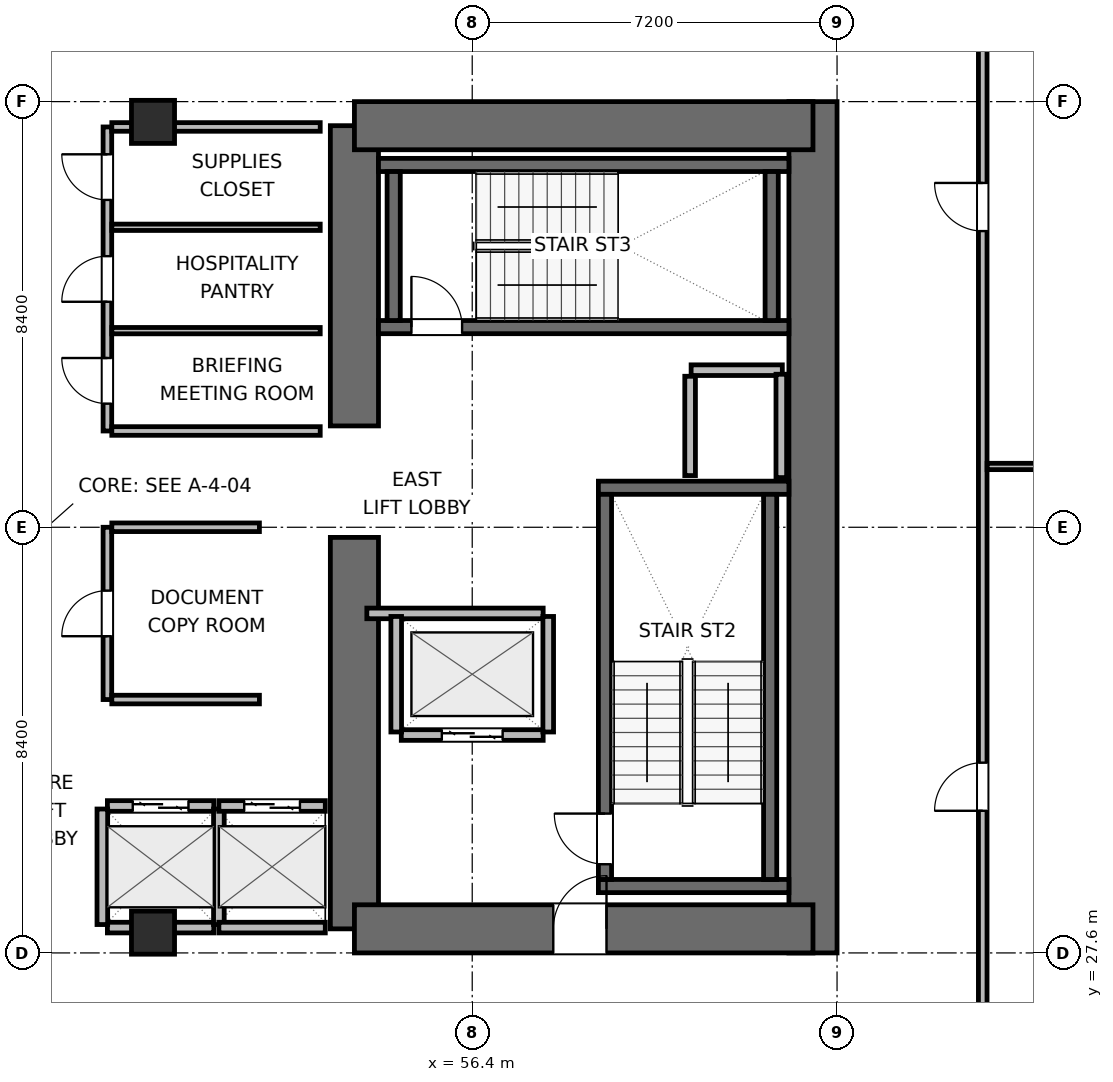
"""IFC4 building model, lengths in metres.
Left out: names, types, materials, properties, quantities, classifications, styles, units other than length and angle.
Written with IfcOpenShell. Run it as: python <this file> out.ifc"""

import sys

from ifc_helpers import new_model, si_unit, direction, frame, frame_2d, origin, origin_2d, place, context, subcontext, project, spatial, rectangle, extrude, element, fill, save


model = new_model("IFC4")
c1 = context("Model", 3, precision=1e-05, world=origin(), true_north=direction((0.0, 1.0)))
c2 = subcontext(c1, "Body", "Model", "MODEL_VIEW")
j1 = project(units=[si_unit("LENGTHUNIT", "METRE"), si_unit("PLANEANGLEUNIT", "RADIAN")], contexts=[c1])
p1 = place(None, origin())
s1 = spatial("IfcSite", under=j1, at=p1, CompositionType="ELEMENT")
p2 = place(p1, origin())
s2 = spatial("IfcBuilding", under=s1, at=p2, CompositionType="ELEMENT")
p3 = place(p2, frame((0.0, 0.0, 60.6)))
s3 = spatial("IfcBuildingStorey", under=s2, at=p3, CompositionType="ELEMENT", Elevation=60.6)
p4 = place(p3, frame((54.075, 28.075, 0.0), z_axis=(0.0, 0.0, 1.0), x_axis=(0.0, 1.0, 0.0)))
e1 = element("IfcWall", 1, at=p4, inside=s3, PredefinedType="SHEAR", context=c2, shape_type="SweptSolid", body=[
    extrude(rectangle(XDim=7.725, YDim=0.95, at=frame_2d((3.863, 0.0))), origin(), (0.0, 0.0, 1.0), 3.9),
])
p5 = place(p3, frame((54.075, 38.0, 0.0), z_axis=(0.0, 0.0, 1.0), x_axis=(0.0, 1.0, 0.0)))
e2 = element("IfcWall", 2, at=p5, inside=s3, PredefinedType="SHEAR", context=c2, shape_type="SweptSolid", body=[
    extrude(rectangle(XDim=5.925, YDim=0.95, at=frame_2d((2.962, 0.0))), origin(), (0.0, 0.0, 1.0), 3.9),
])
p6 = place(p3, frame((63.125, 27.6, 0.0), z_axis=(0.0, 0.0, 1.0), x_axis=(0.0, 1.0, 0.0)))
e3 = element("IfcWall", 3, at=p6, inside=s3, PredefinedType="SHEAR", context=c2, shape_type="SweptSolid", body=[
    extrude(rectangle(XDim=16.8, YDim=0.95, at=frame_2d((8.4, 0.0))), origin(), (0.0, 0.0, 1.0), 3.9),
])
p7 = place(p3, frame((54.075, 28.075, 0.0), z_axis=(0.0, 0.0, 1.0), x_axis=(1.0, 0.0, 0.0)))
e4 = element("IfcWall", 4, at=p7, inside=s3, PredefinedType="SHEAR", context=c2, shape_type="SweptSolid", body=[
    extrude(rectangle(XDim=9.05, YDim=0.95, at=frame_2d((4.525, 0.0))), origin(), (0.0, 0.0, 1.0), 3.9),
])
p8 = place(p7, frame((3.925, 0.0, 0.0)))
e5 = element("IfcOpeningElement", 5, at=p8, cuts=e4, PredefinedType="OPENING", context=c2, shape_type="SweptSolid", body=[
    extrude(rectangle(XDim=1.05, YDim=2.04, at=frame_2d((0.525, 1.02))), frame((0.0, 0.485, 0.0), z_axis=(0.0, -1.0, 0.0), x_axis=(1.0, 0.0, 0.0)), (0.0, 0.0, 1.0), 0.97),
])
p9 = place(p3, frame((54.075, 43.925, 0.0), z_axis=(0.0, 0.0, 1.0), x_axis=(1.0, 0.0, 0.0)))
e6 = element("IfcWall", 6, at=p9, inside=s3, PredefinedType="SHEAR", context=c2, shape_type="SweptSolid", body=[
    extrude(rectangle(XDim=9.05, YDim=0.95, at=frame_2d((4.525, 0.0))), origin(), (0.0, 0.0, 1.0), 3.9),
])
for number, where, z_axis, x_axis in (
    (7, (58.89, 28.92, 0.0), (0.0, 0.0, 1.0), (1.0, 0.0, 0.0)),
    (8, (58.89, 36.78, 0.0), (0.0, 0.0, 1.0), (1.0, 0.0, 0.0)),
):
    element("IfcWall", number, at=place(p3, frame(where, z_axis=z_axis, x_axis=x_axis)), inside=s3, PredefinedType="SHEAR", context=c2, shape_type="SweptSolid", body=[
        extrude(rectangle(XDim=3.76, YDim=0.26, at=frame_2d((1.88, 0.0))), origin(), (0.0, 0.0, 1.0), 3.9),
    ])
p10 = place(p3, frame((59.02, 29.05, 0.0), z_axis=(0.0, 0.0, 1.0), x_axis=(0.0, 1.0, 0.0)))
e9 = element("IfcWall", 9, at=p10, inside=s3, PredefinedType="SHEAR", context=c2, shape_type="SweptSolid", body=[
    extrude(rectangle(XDim=7.6, YDim=0.26, at=frame_2d((3.8, 0.0))), origin(), (0.0, 0.0, 1.0), 3.9),
])
p11 = place(p10, frame((0.3, 0.0, 0.0)))
e10 = element("IfcOpeningElement", 10, at=p11, cuts=e9, PredefinedType="OPENING", context=c2, shape_type="SweptSolid", body=[
    extrude(rectangle(XDim=1.0, YDim=2.04, at=frame_2d((0.5, 1.02))), frame((0.0, 0.14, 0.0), z_axis=(0.0, -1.0, 0.0), x_axis=(1.0, 0.0, 0.0)), (0.0, 0.0, 1.0), 0.28),
])
p12 = place(p3, frame((62.28, 29.05, 0.0), z_axis=(0.0, 0.0, 1.0), x_axis=(0.0, 1.0, 0.0)))
e11 = element("IfcWall", 11, at=p12, inside=s3, PredefinedType="SHEAR", context=c2, shape_type="SweptSolid", body=[
    extrude(rectangle(XDim=7.6, YDim=0.26, at=frame_2d((3.8, 0.0))), origin(), (0.0, 0.0, 1.0), 3.9),
])
p13 = place(p3, frame((54.55, 39.95, 0.0), z_axis=(0.0, 0.0, 1.0), x_axis=(1.0, 0.0, 0.0)))
e12 = element("IfcWall", 12, at=p13, inside=s3, PredefinedType="SHEAR", context=c2, shape_type="SweptSolid", body=[
    extrude(rectangle(XDim=8.1, YDim=0.26, at=frame_2d((4.05, 0.0))), origin(), (0.0, 0.0, 1.0), 3.9),
])
p14 = place(p13, frame((0.65, 0.0, 0.0)))
e13 = element("IfcOpeningElement", 13, at=p14, cuts=e12, PredefinedType="OPENING", context=c2, shape_type="SweptSolid", body=[
    extrude(rectangle(XDim=1.0, YDim=2.04, at=frame_2d((0.5, 1.02))), frame((0.0, 0.14, 0.0), z_axis=(0.0, -1.0, 0.0), x_axis=(1.0, 0.0, 0.0)), (0.0, 0.0, 1.0), 0.28),
])
p15 = place(p3, frame((54.55, 43.15, 0.0), z_axis=(0.0, 0.0, 1.0), x_axis=(1.0, 0.0, 0.0)))
e14 = element("IfcWall", 14, at=p15, inside=s3, PredefinedType="SHEAR", context=c2, shape_type="SweptSolid", body=[
    extrude(rectangle(XDim=8.1, YDim=0.26, at=frame_2d((4.05, 0.0))), origin(), (0.0, 0.0, 1.0), 3.9),
])
for number, where, z_axis, x_axis in (
    (15, (54.85, 40.08, 0.0), (0.0, 0.0, 1.0), (0.0, 1.0, 0.0)),
    (16, (62.31, 40.08, 0.0), (0.0, 0.0, 1.0), (0.0, 1.0, 0.0)),
):
    element("IfcWall", number, at=place(p3, frame(where, z_axis=z_axis, x_axis=x_axis)), inside=s3, PredefinedType="SHEAR", context=c2, shape_type="SweptSolid", body=[
        extrude(rectangle(XDim=2.94, YDim=0.26, at=frame_2d((1.47, 0.0))), origin(), (0.0, 0.0, 1.0), 3.9),
    ])
for number, where, z_axis, x_axis in (
    (17, (50.1, 28.0, 0.0), (0.0, 0.0, 1.0), (1.0, 0.0, 0.0)),
    (18, (50.1, 44.0, 0.0), (0.0, 0.0, 1.0), (1.0, 0.0, 0.0)),
):
    element("IfcColumn", number, at=place(p3, frame(where, z_axis=z_axis, x_axis=x_axis)), inside=s3, PredefinedType="COLUMN", context=c2, shape_type="SweptSolid", body=[
        extrude(rectangle(XDim=0.85, YDim=0.85, at=origin_2d()), origin(), (0.0, 0.0, 1.0), 3.9),
    ])
p16 = place(p3, frame((60.72, 39.1, 0.0), z_axis=(0.0, 0.0, 1.0), x_axis=(1.0, 0.0, 0.0)))
e19 = element("IfcWall", 19, at=p16, inside=s3, PredefinedType="PARTITIONING", context=c2, shape_type="SweptSolid", body=[
    extrude(rectangle(XDim=1.8, YDim=0.21, at=frame_2d((0.9, 0.0))), origin(), (0.0, 0.0, 1.0), 3.64),
])
p17 = place(p3, frame((60.7, 37.02, 0.0), z_axis=(0.0, 0.0, 1.0), x_axis=(0.0, 1.0, 0.0)))
e20 = element("IfcWall", 20, at=p17, inside=s3, PredefinedType="PARTITIONING", context=c2, shape_type="SweptSolid", body=[
    extrude(rectangle(XDim=1.96, YDim=0.21, at=frame_2d((0.98, 0.0))), origin(), (0.0, 0.0, 1.0), 3.64),
])
p18 = place(p3, frame((62.5, 36.98, 0.0), z_axis=(0.0, 0.0, 1.0), x_axis=(0.0, 1.0, 0.0)))
e21 = element("IfcWall", 21, at=p18, inside=s3, PredefinedType="PARTITIONING", context=c2, shape_type="SweptSolid", body=[
    extrude(rectangle(XDim=2.04, YDim=0.21, at=frame_2d((1.02, 0.0))), origin(), (0.0, 0.0, 1.0), 3.64),
])
p19 = place(p3, frame((55.0, 31.9, 0.0), z_axis=(0.0, 0.0, 1.0), x_axis=(1.0, 0.0, 0.0)))
e22 = element("IfcWall", 22, at=p19, inside=s3, PredefinedType="PARTITIONING", context=c2, shape_type="SweptSolid", body=[
    extrude(rectangle(XDim=2.8, YDim=0.21, at=frame_2d((1.4, 0.0))), origin(), (0.0, 0.0, 1.0), 3.64),
])
p20 = place(p19, frame((0.8, 0.0, 0.0)))
e23 = element("IfcOpeningElement", 23, at=p20, cuts=e22, PredefinedType="OPENING", context=c2, shape_type="SweptSolid", body=[
    extrude(rectangle(XDim=1.2, YDim=2.04, at=frame_2d((0.6, 1.02))), frame((0.0, 0.115, 0.0), z_axis=(0.0, -1.0, 0.0), x_axis=(1.0, 0.0, 0.0)), (0.0, 0.0, 1.0), 0.23),
])
p21 = place(p3, frame((54.32, 34.3, 0.0), z_axis=(0.0, 0.0, 1.0), x_axis=(1.0, 0.0, 0.0)))
e24 = element("IfcWall", 24, at=p21, inside=s3, PredefinedType="PARTITIONING", context=c2, shape_type="SweptSolid", body=[
    extrude(rectangle(XDim=3.48, YDim=0.21, at=frame_2d((1.74, 0.0))), origin(), (0.0, 0.0, 1.0), 3.64),
])
for number, where, z_axis, x_axis in (
    (25, (54.9, 31.96, 0.0), (0.0, 0.0, 1.0), (0.0, 1.0, 0.0)),
    (26, (57.9, 31.96, 0.0), (0.0, 0.0, 1.0), (0.0, 1.0, 0.0)),
):
    element("IfcWall", number, at=place(p3, frame(where, z_axis=z_axis, x_axis=x_axis)), inside=s3, PredefinedType="PARTITIONING", context=c2, shape_type="SweptSolid", body=[
        extrude(rectangle(XDim=2.28, YDim=0.21, at=frame_2d((1.14, 0.0))), origin(), (0.0, 0.0, 1.0), 3.64),
    ])
p22 = place(p3, frame((49.2, 30.5, 0.0), z_axis=(0.0, 0.0, 1.0), x_axis=(1.0, 0.0, 0.0)))
e27 = element("IfcWall", 27, at=p22, inside=s3, PredefinedType="PARTITIONING", context=c2, shape_type="SweptSolid", body=[
    extrude(rectangle(XDim=2.1, YDim=0.21, at=frame_2d((1.05, 0.0))), origin(), (0.0, 0.0, 1.0), 3.64),
])
p23 = place(p22, frame((0.5, 0.0, 0.0)))
e28 = element("IfcOpeningElement", 28, at=p23, cuts=e27, PredefinedType="OPENING", context=c2, shape_type="SweptSolid", body=[
    extrude(rectangle(XDim=1.1, YDim=2.04, at=frame_2d((0.55, 1.02))), frame((0.0, 0.115, 0.0), z_axis=(0.0, -1.0, 0.0), x_axis=(1.0, 0.0, 0.0)), (0.0, 0.0, 1.0), 0.23),
])
p24 = place(p3, frame((49.2, 28.1, 0.0), z_axis=(0.0, 0.0, 1.0), x_axis=(1.0, 0.0, 0.0)))
e29 = element("IfcWall", 29, at=p24, inside=s3, PredefinedType="PARTITIONING", context=c2, shape_type="SweptSolid", body=[
    extrude(rectangle(XDim=2.1, YDim=0.21, at=frame_2d((1.05, 0.0))), origin(), (0.0, 0.0, 1.0), 2.525),
])
for number, where, z_axis, x_axis in (
    (30, (49.1, 28.16, 0.0), (0.0, 0.0, 1.0), (0.0, 1.0, 0.0)),
    (31, (51.4, 28.16, 0.0), (0.0, 0.0, 1.0), (0.0, 1.0, 0.0)),
):
    element("IfcWall", number, at=place(p3, frame(where, z_axis=z_axis, x_axis=x_axis)), inside=s3, PredefinedType="PARTITIONING", context=c2, shape_type="SweptSolid", body=[
        extrude(rectangle(XDim=2.28, YDim=0.21, at=frame_2d((1.14, 0.0))), origin(), (0.0, 0.0, 1.0), 3.64),
    ])
p25 = place(p3, frame((51.4, 30.5, 0.0), z_axis=(0.0, 0.0, 1.0), x_axis=(1.0, 0.0, 0.0)))
e32 = element("IfcWall", 32, at=p25, inside=s3, PredefinedType="PARTITIONING", context=c2, shape_type="SweptSolid", body=[
    extrude(rectangle(XDim=2.1, YDim=0.21, at=frame_2d((1.05, 0.0))), origin(), (0.0, 0.0, 1.0), 3.64),
])
p26 = place(p25, frame((0.5, 0.0, 0.0)))
e33 = element("IfcOpeningElement", 33, at=p26, cuts=e32, PredefinedType="OPENING", context=c2, shape_type="SweptSolid", body=[
    extrude(rectangle(XDim=1.1, YDim=2.04, at=frame_2d((0.55, 1.02))), frame((0.0, 0.115, 0.0), z_axis=(0.0, -1.0, 0.0), x_axis=(1.0, 0.0, 0.0)), (0.0, 0.0, 1.0), 0.23),
])
p27 = place(p3, frame((51.4, 28.1, 0.0), z_axis=(0.0, 0.0, 1.0), x_axis=(1.0, 0.0, 0.0)))
e34 = element("IfcWall", 34, at=p27, inside=s3, PredefinedType="PARTITIONING", context=c2, shape_type="SweptSolid", body=[
    extrude(rectangle(XDim=2.1, YDim=0.21, at=frame_2d((1.05, 0.0))), origin(), (0.0, 0.0, 1.0), 2.525),
])
p28 = place(p3, frame((49.2, 32.6, 0.0), z_axis=(0.0, 0.0, 1.0), x_axis=(0.0, 1.0, 0.0)))
e35 = element("IfcWall", 35, at=p28, inside=s3, PredefinedType="PARTITIONING", context=c2, shape_type="SweptSolid", body=[
    extrude(rectangle(XDim=3.4, YDim=0.17, at=frame_2d((1.7, 0.0))), origin(), (0.0, 0.0, 1.0), 3.64),
])
p29 = place(p28, frame((1.25, 0.0, 0.0)))
e36 = element("IfcOpeningElement", 36, at=p29, cuts=e35, PredefinedType="OPENING", context=c2, shape_type="SweptSolid", body=[
    extrude(rectangle(XDim=0.9, YDim=2.02, at=frame_2d((0.45, 1.01))), frame((0.0, 0.095, 0.0), z_axis=(0.0, -1.0, 0.0), x_axis=(1.0, 0.0, 0.0)), (0.0, 0.0, 1.0), 0.19),
])
for number, where, z_axis, x_axis in (
    (37, (49.287, 32.6, 0.0), (0.0, 0.0, 1.0), (1.0, 0.0, 0.0)),
    (38, (49.287, 36.0, 0.0), (0.0, 0.0, 1.0), (1.0, 0.0, 0.0)),
):
    element("IfcWall", number, at=place(p3, frame(where, z_axis=z_axis, x_axis=x_axis)), inside=s3, PredefinedType="PARTITIONING", context=c2, shape_type="SweptSolid", body=[
        extrude(rectangle(XDim=2.913, YDim=0.17, at=frame_2d((1.457, 0.0))), origin(), (0.0, 0.0, 1.0), 3.64),
    ])
p30 = place(p3, frame((49.2, 37.9, 0.0), z_axis=(0.0, 0.0, 1.0), x_axis=(0.0, 1.0, 0.0)))
e39 = element("IfcWall", 39, at=p30, inside=s3, PredefinedType="PARTITIONING", context=c2, shape_type="SweptSolid", body=[
    extrude(rectangle(XDim=6.0, YDim=0.17, at=frame_2d((3.0, 0.0))), origin(), (0.0, 0.0, 1.0), 3.64),
])
p31 = place(p30, frame((0.54, 0.0, 0.0)))
e40 = element("IfcOpeningElement", 40, at=p31, cuts=e39, PredefinedType="OPENING", context=c2, shape_type="SweptSolid", body=[
    extrude(rectangle(XDim=0.9, YDim=2.02, at=frame_2d((0.45, 1.01))), frame((0.0, 0.095, 0.0), z_axis=(0.0, -1.0, 0.0), x_axis=(1.0, 0.0, 0.0)), (0.0, 0.0, 1.0), 0.19),
])
p32 = place(p30, frame((2.55, 0.0, 0.0)))
e41 = element("IfcOpeningElement", 41, at=p32, cuts=e39, PredefinedType="OPENING", context=c2, shape_type="SweptSolid", body=[
    extrude(rectangle(XDim=0.9, YDim=2.02, at=frame_2d((0.45, 1.01))), frame((0.0, 0.095, 0.0), z_axis=(0.0, -1.0, 0.0), x_axis=(1.0, 0.0, 0.0)), (0.0, 0.0, 1.0), 0.19),
])
p33 = place(p30, frame((4.56, 0.0, 0.0)))
e42 = element("IfcOpeningElement", 42, at=p33, cuts=e39, PredefinedType="OPENING", context=c2, shape_type="SweptSolid", body=[
    extrude(rectangle(XDim=0.9, YDim=2.02, at=frame_2d((0.45, 1.01))), frame((0.0, 0.095, 0.0), z_axis=(0.0, -1.0, 0.0), x_axis=(1.0, 0.0, 0.0)), (0.0, 0.0, 1.0), 0.19),
])
p34 = place(p3, frame((49.287, 37.9, 0.0), z_axis=(0.0, 0.0, 1.0), x_axis=(1.0, 0.0, 0.0)))
e43 = element("IfcWall", 43, at=p34, inside=s3, PredefinedType="PARTITIONING", context=c2, shape_type="SweptSolid", body=[
    extrude(rectangle(XDim=4.113, YDim=0.17, at=frame_2d((2.056, 0.0))), origin(), (0.0, 0.0, 1.0), 3.64),
])
p35 = place(p3, frame((49.287, 43.9, 0.0), z_axis=(0.0, 0.0, 1.0), x_axis=(1.0, 0.0, 0.0)))
e44 = element("IfcWall", 44, at=p35, inside=s3, PredefinedType="PARTITIONING", context=c2, shape_type="SweptSolid", body=[
    extrude(rectangle(XDim=4.113, YDim=0.17, at=frame_2d((2.056, 0.0))), origin(), (0.0, 0.0, 1.0), 2.525),
])
for number, where, z_axis, x_axis in (
    (45, (49.287, 39.88, 0.0), (0.0, 0.0, 1.0), (1.0, 0.0, 0.0)),
    (46, (49.287, 41.92, 0.0), (0.0, 0.0, 1.0), (1.0, 0.0, 0.0)),
):
    element("IfcWall", number, at=place(p3, frame(where, z_axis=z_axis, x_axis=x_axis)), inside=s3, PredefinedType="PARTITIONING", context=c2, shape_type="SweptSolid", body=[
        extrude(rectangle(XDim=4.113, YDim=0.125, at=frame_2d((2.056, 0.0))), origin(), (0.0, 0.0, 1.0), 3.64),
    ])
p36 = place(p3, frame((66.475, 24.647, 0.0), z_axis=(0.0, 0.0, 1.0), x_axis=(0.0, 1.0, 0.0)))
e47 = element("IfcWall", 47, at=p36, inside=s3, PredefinedType="PARTITIONING", context=c2, shape_type="SweptSolid", body=[
    extrude(rectangle(XDim=22.706, YDim=0.17, at=frame_2d((11.353, 0.0))), origin(), (0.0, 0.0, 1.0), 3.64),
])
p37 = place(p36, frame((5.758, 0.0, 0.0)))
e48 = element("IfcOpeningElement", 48, at=p37, cuts=e47, PredefinedType="OPENING", context=c2, shape_type="SweptSolid", body=[
    extrude(rectangle(XDim=0.95, YDim=2.04, at=frame_2d((0.475, 1.02))), frame((0.0, 0.095, 0.0), z_axis=(0.0, -1.0, 0.0), x_axis=(1.0, 0.0, 0.0)), (0.0, 0.0, 1.0), 0.19),
])
p38 = place(p36, frame((17.198, 0.0, 0.0)))
e49 = element("IfcOpeningElement", 49, at=p38, cuts=e47, PredefinedType="OPENING", context=c2, shape_type="SweptSolid", body=[
    extrude(rectangle(XDim=0.95, YDim=2.04, at=frame_2d((0.475, 1.02))), frame((0.0, 0.095, 0.0), z_axis=(0.0, -1.0, 0.0), x_axis=(1.0, 0.0, 0.0)), (0.0, 0.0, 1.0), 0.19),
])
p39 = place(p3, frame((66.562, 37.2, 0.0), z_axis=(0.0, 0.0, 1.0), x_axis=(1.0, 0.0, 0.0)))
e50 = element("IfcWall", 50, at=p39, inside=s3, PredefinedType="PARTITIONING", context=c2, shape_type="SweptSolid", body=[
    extrude(rectangle(XDim=12.393, YDim=0.125, at=frame_2d((6.197, 0.0))), origin(), (0.0, 0.0, 1.0), 3.64),
])
p40 = place(p11, origin())
e51 = element("IfcDoor", 51, at=p40, inside=s3, OperationType="SINGLE_SWING_RIGHT", PredefinedType="DOOR", context=c2, shape_type="SweptSolid", body=[
    extrude(rectangle(XDim=1.0, YDim=2.04, at=frame_2d((0.5, 1.02))), frame((0.0, 0.025, 0.0), z_axis=(0.0, -1.0, 0.0), x_axis=(1.0, 0.0, 0.0)), (0.0, 0.0, 1.0), 0.05),
])
fill(e10, e51)
p41 = place(p14, origin())
e52 = element("IfcDoor", 52, at=p41, inside=s3, OperationType="SINGLE_SWING_LEFT", PredefinedType="DOOR", context=c2, shape_type="SweptSolid", body=[
    extrude(rectangle(XDim=1.0, YDim=2.04, at=frame_2d((0.5, 1.02))), frame((0.0, 0.025, 0.0), z_axis=(0.0, -1.0, 0.0), x_axis=(1.0, 0.0, 0.0)), (0.0, 0.0, 1.0), 0.05),
])
fill(e13, e52)
p42 = place(p20, origin())
e53 = element("IfcDoor", 53, at=p42, inside=s3, OperationType="DOUBLE_DOOR_SLIDING", PredefinedType="DOOR", context=c2, shape_type="SweptSolid", body=[
    extrude(rectangle(XDim=1.2, YDim=2.04, at=frame_2d((0.6, 1.02))), frame((0.0, 0.025, 0.0), z_axis=(0.0, -1.0, 0.0), x_axis=(1.0, 0.0, 0.0)), (0.0, 0.0, 1.0), 0.05),
])
fill(e23, e53)
p43 = place(p23, origin())
e54 = element("IfcDoor", 54, at=p43, inside=s3, OperationType="DOUBLE_DOOR_SLIDING", PredefinedType="DOOR", context=c2, shape_type="SweptSolid", body=[
    extrude(rectangle(XDim=1.1, YDim=2.04, at=frame_2d((0.55, 1.02))), frame((0.0, 0.025, 0.0), z_axis=(0.0, -1.0, 0.0), x_axis=(1.0, 0.0, 0.0)), (0.0, 0.0, 1.0), 0.05),
])
fill(e28, e54)
p44 = place(p26, origin())
e55 = element("IfcDoor", 55, at=p44, inside=s3, OperationType="DOUBLE_DOOR_SLIDING", PredefinedType="DOOR", context=c2, shape_type="SweptSolid", body=[
    extrude(rectangle(XDim=1.1, YDim=2.04, at=frame_2d((0.55, 1.02))), frame((0.0, 0.025, 0.0), z_axis=(0.0, -1.0, 0.0), x_axis=(1.0, 0.0, 0.0)), (0.0, 0.0, 1.0), 0.05),
])
fill(e33, e55)
p45 = place(p8, origin())
e56 = element("IfcDoor", 56, at=p45, inside=s3, OperationType="SINGLE_SWING_RIGHT", PredefinedType="DOOR", context=c2, shape_type="SweptSolid", body=[
    extrude(rectangle(XDim=1.05, YDim=2.04, at=frame_2d((0.525, 1.02))), frame((0.0, 0.025, 0.0), z_axis=(0.0, -1.0, 0.0), x_axis=(1.0, 0.0, 0.0)), (0.0, 0.0, 1.0), 0.05),
])
fill(e5, e56)
p46 = place(p29, origin())
e57 = element("IfcDoor", 57, at=p46, inside=s3, OperationType="SINGLE_SWING_LEFT", PredefinedType="DOOR", context=c2, shape_type="SweptSolid", body=[
    extrude(rectangle(XDim=0.9, YDim=2.02, at=frame_2d((0.45, 1.01))), frame((0.0, 0.025, 0.0), z_axis=(0.0, -1.0, 0.0), x_axis=(1.0, 0.0, 0.0)), (0.0, 0.0, 1.0), 0.05),
])
fill(e36, e57)
p47 = place(p31, origin())
e58 = element("IfcDoor", 58, at=p47, inside=s3, OperationType="SINGLE_SWING_RIGHT", PredefinedType="DOOR", context=c2, shape_type="SweptSolid", body=[
    extrude(rectangle(XDim=0.9, YDim=2.02, at=frame_2d((0.45, 1.01))), frame((0.0, 0.025, 0.0), z_axis=(0.0, -1.0, 0.0), x_axis=(1.0, 0.0, 0.0)), (0.0, 0.0, 1.0), 0.05),
])
fill(e40, e58)
p48 = place(p32, origin())
e59 = element("IfcDoor", 59, at=p48, inside=s3, OperationType="SINGLE_SWING_LEFT", PredefinedType="DOOR", context=c2, shape_type="SweptSolid", body=[
    extrude(rectangle(XDim=0.9, YDim=2.02, at=frame_2d((0.45, 1.01))), frame((0.0, 0.025, 0.0), z_axis=(0.0, -1.0, 0.0), x_axis=(1.0, 0.0, 0.0)), (0.0, 0.0, 1.0), 0.05),
])
fill(e41, e59)
p49 = place(p33, origin())
e60 = element("IfcDoor", 60, at=p49, inside=s3, OperationType="SINGLE_SWING_RIGHT", PredefinedType="DOOR", context=c2, shape_type="SweptSolid", body=[
    extrude(rectangle(XDim=0.9, YDim=2.02, at=frame_2d((0.45, 1.01))), frame((0.0, 0.025, 0.0), z_axis=(0.0, -1.0, 0.0), x_axis=(1.0, 0.0, 0.0)), (0.0, 0.0, 1.0), 0.05),
])
fill(e42, e60)
p50 = place(p37, origin())
e61 = element("IfcDoor", 61, at=p50, inside=s3, OperationType="SINGLE_SWING_LEFT", PredefinedType="DOOR", context=c2, shape_type="SweptSolid", body=[
    extrude(rectangle(XDim=0.95, YDim=2.04, at=frame_2d((0.475, 1.02))), frame((0.0, 0.025, 0.0), z_axis=(0.0, -1.0, 0.0), x_axis=(1.0, 0.0, 0.0)), (0.0, 0.0, 1.0), 0.05),
])
fill(e48, e61)
p51 = place(p38, origin())
e62 = element("IfcDoor", 62, at=p51, inside=s3, OperationType="SINGLE_SWING_RIGHT", PredefinedType="DOOR", context=c2, shape_type="SweptSolid", body=[
    extrude(rectangle(XDim=0.95, YDim=2.04, at=frame_2d((0.475, 1.02))), frame((0.0, 0.025, 0.0), z_axis=(0.0, -1.0, 0.0), x_axis=(1.0, 0.0, 0.0)), (0.0, 0.0, 1.0), 0.05),
])
fill(e49, e62)
save(model, sys.argv[1])
